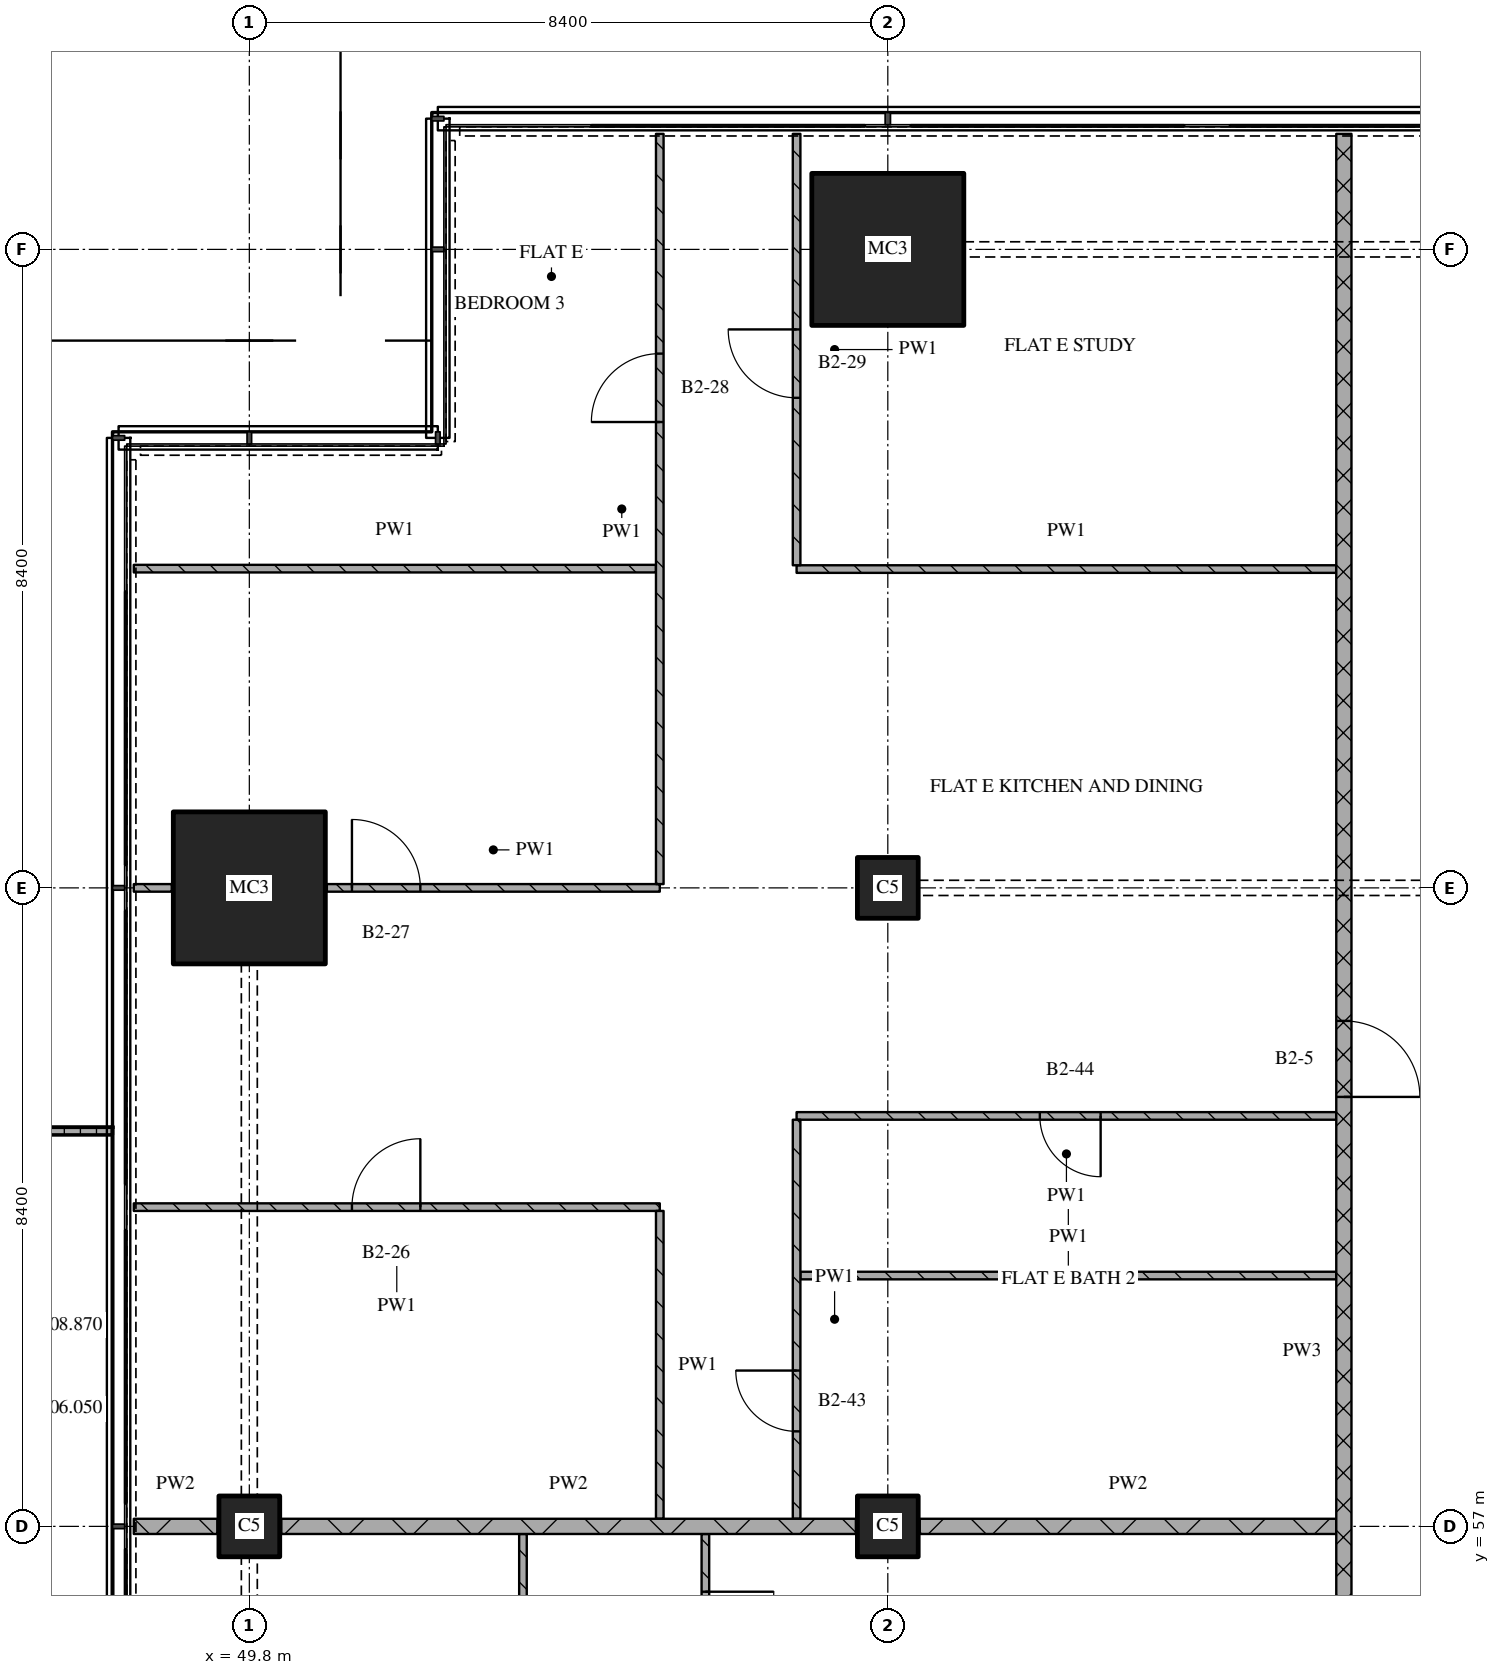
"""IFC4 building model, lengths in metres.
Left out: names, types, materials, properties, quantities, classifications, styles, units other than length and angle.
Written with IfcOpenShell. Run it as: python <this file> out.ifc"""

import sys

from ifc_helpers import new_model, si_unit, direction, frame, frame_2d, origin, origin_2d, place, context, subcontext, project, spatial, polyline, rectangle, outline, extrude, element, fill, save


model = new_model("IFC4")
c1 = context("Model", 3, precision=1e-05, world=origin(), true_north=direction((0.0, 1.0)))
c2 = subcontext(c1, "Body", "Model", "MODEL_VIEW")
j1 = project(units=[si_unit("LENGTHUNIT", "METRE"), si_unit("PLANEANGLEUNIT", "RADIAN")], contexts=[c1])
p1 = place(None, origin())
s1 = spatial("IfcSite", under=j1, at=p1, CompositionType="ELEMENT")
p2 = place(p1, origin())
s2 = spatial("IfcBuilding", under=s1, at=p2, CompositionType="ELEMENT")
p3 = place(p2, frame((0.0, 0.0, 106.05)))
s3 = spatial("IfcBuildingStorey", under=s2, at=p3, CompositionType="ELEMENT", Elevation=106.05)
p4 = place(p3, frame((49.8, 57.0, 0.0), z_axis=(0.0, 0.0, 1.0), x_axis=(1.0, 0.0, 0.0)))
e1 = element("IfcColumn", 1, at=p4, inside=s3, PredefinedType="COLUMN", context=c2, shape_type="SweptSolid", body=[
    extrude(rectangle(XDim=0.8, YDim=0.8, at=origin_2d()), origin(), (0.0, 0.0, 1.0), 3.6),
])
p5 = place(p3, frame((49.8, 65.4, 0.0), z_axis=(0.0, 0.0, 1.0), x_axis=(1.0, 0.0, 0.0)))
e2 = element("IfcColumn", 2, at=p5, inside=s3, PredefinedType="COLUMN", context=c2, shape_type="SweptSolid", body=[
    extrude(rectangle(XDim=2.0, YDim=2.0, at=origin_2d()), origin(), (0.0, 0.0, 1.0), 3.6),
])
for number, where, z_axis, x_axis in (
    (3, (58.2, 57.0, 0.0), (0.0, 0.0, 1.0), (1.0, 0.0, 0.0)),
    (4, (58.2, 65.4, 0.0), (0.0, 0.0, 1.0), (1.0, 0.0, 0.0)),
):
    element("IfcColumn", number, at=place(p3, frame(where, z_axis=z_axis, x_axis=x_axis)), inside=s3, PredefinedType="COLUMN", context=c2, shape_type="SweptSolid", body=[
        extrude(rectangle(XDim=0.8, YDim=0.8, at=origin_2d()), origin(), (0.0, 0.0, 1.0), 3.6),
    ])
p6 = place(p3, frame((58.2, 73.8, 0.0), z_axis=(0.0, 0.0, 1.0), x_axis=(1.0, 0.0, 0.0)))
e5 = element("IfcColumn", 5, at=p6, inside=s3, PredefinedType="COLUMN", context=c2, shape_type="SweptSolid", body=[
    extrude(rectangle(XDim=2.0, YDim=2.0, at=origin_2d()), origin(), (0.0, 0.0, 1.0), 3.6),
])
p7 = place(p3, origin())
e6 = element("IfcWall", 6, at=p7, inside=s3, PredefinedType="SOLIDWALL", context=c2, shape_type="SweptSolid", body=[
    extrude(outline(polyline([(48.0, 62.25), (48.0, 62.15), (46.233, 62.15), (46.233, 56.05), (48.0, 56.05), (48.0, 55.95), (46.133, 55.95), (46.133, 62.25), (48.0, 62.25)])), origin(), (0.0, 0.0, 1.0), 1.0),
])
p8 = place(p3, frame((48.28, 57.0, 0.0), z_axis=(0.0, 0.0, 1.0), x_axis=(1.0, 0.0, 0.0)))
e7 = element("IfcWall", 7, at=p8, inside=s3, PredefinedType="PARTITIONING", context=c2, shape_type="SweptSolid", body=[
    extrude(rectangle(XDim=1.1, YDim=0.2, at=frame_2d((0.55, 0.0))), origin(), (0.0, 0.0, 1.0), 3.32),
])
p9 = place(p3, frame((50.22, 57.0, 0.0), z_axis=(0.0, 0.0, 1.0), x_axis=(1.0, 0.0, 0.0)))
e8 = element("IfcWall", 8, at=p9, inside=s3, PredefinedType="PARTITIONING", context=c2, shape_type="SweptSolid", body=[
    extrude(rectangle(XDim=7.56, YDim=0.2, at=frame_2d((3.78, 0.0))), origin(), (0.0, 0.0, 1.0), 3.32),
])
p10 = place(p3, frame((58.62, 57.0, 0.0), z_axis=(0.0, 0.0, 1.0), x_axis=(1.0, 0.0, 0.0)))
e9 = element("IfcWall", 9, at=p10, inside=s3, PredefinedType="PARTITIONING", context=c2, shape_type="SweptSolid", body=[
    extrude(rectangle(XDim=5.48, YDim=0.2, at=frame_2d((2.74, 0.0))), origin(), (0.0, 0.0, 1.0), 3.32),
])
p11 = place(p3, frame((57.05, 60.3, 0.0), z_axis=(0.0, 0.0, 1.0), x_axis=(1.0, 0.0, 0.0)))
e10 = element("IfcWall", 10, at=p11, inside=s3, PredefinedType="PARTITIONING", context=c2, shape_type="SweptSolid", body=[
    extrude(rectangle(XDim=7.05, YDim=0.1, at=frame_2d((3.525, 0.0))), origin(), (0.0, 0.0, 1.0), 3.32),
])
p12 = place(p3, frame((55.2, 61.2, 0.0), z_axis=(0.0, 0.0, 1.0), x_axis=(-1.0, 0.0, 0.0)))
e11 = element("IfcWall", 11, at=p12, inside=s3, PredefinedType="PARTITIONING", context=c2, shape_type="SweptSolid", body=[
    extrude(rectangle(XDim=6.92, YDim=0.1, at=frame_2d((3.46, 0.0))), origin(), (0.0, 0.0, 1.0), 3.32),
])
p13 = place(p12, frame((3.15, 0.0, 0.0)))
e12 = element("IfcOpeningElement", 12, at=p13, cuts=e11, PredefinedType="OPENING", context=c2, shape_type="SweptSolid", body=[
    extrude(rectangle(XDim=0.9, YDim=2.1, at=frame_2d((0.45, 1.05))), frame((0.0, 0.06, 0.0), z_axis=(0.0, -1.0, 0.0), x_axis=(1.0, 0.0, 0.0)), (0.0, 0.0, 1.0), 0.12),
])
p14 = place(p3, frame((64.1, 62.4, 0.0), z_axis=(0.0, 0.0, 1.0), x_axis=(-1.0, 0.0, 0.0)))
e13 = element("IfcWall", 13, at=p14, inside=s3, PredefinedType="PARTITIONING", context=c2, shape_type="SweptSolid", body=[
    extrude(rectangle(XDim=7.1, YDim=0.1, at=frame_2d((3.55, 0.0))), origin(), (0.0, 0.0, 1.0), 3.32),
])
p15 = place(p14, frame((3.1, 0.0, 0.0)))
e14 = element("IfcOpeningElement", 14, at=p15, cuts=e13, PredefinedType="OPENING", context=c2, shape_type="SweptSolid", body=[
    extrude(rectangle(XDim=0.8, YDim=2.1, at=frame_2d((0.4, 1.05))), frame((0.0, 0.06, 0.0), z_axis=(0.0, -1.0, 0.0), x_axis=(1.0, 0.0, 0.0)), (0.0, 0.0, 1.0), 0.12),
])
p16 = place(p3, frame((48.28, 65.4, 0.0), z_axis=(0.0, 0.0, 1.0), x_axis=(1.0, 0.0, 0.0)))
e15 = element("IfcWall", 15, at=p16, inside=s3, PredefinedType="PARTITIONING", context=c2, shape_type="SweptSolid", body=[
    extrude(rectangle(XDim=0.5, YDim=0.1, at=frame_2d((0.25, 0.0))), origin(), (0.0, 0.0, 1.0), 3.32),
])
p17 = place(p3, frame((50.82, 65.4, 0.0), z_axis=(0.0, 0.0, 1.0), x_axis=(1.0, 0.0, 0.0)))
e16 = element("IfcWall", 16, at=p17, inside=s3, PredefinedType="PARTITIONING", context=c2, shape_type="SweptSolid", body=[
    extrude(rectangle(XDim=4.38, YDim=0.1, at=frame_2d((2.19, 0.0))), origin(), (0.0, 0.0, 1.0), 3.32),
])
p18 = place(p17, frame((0.33, 0.0, 0.0)))
e17 = element("IfcOpeningElement", 17, at=p18, cuts=e16, PredefinedType="OPENING", context=c2, shape_type="SweptSolid", body=[
    extrude(rectangle(XDim=0.9, YDim=2.1, at=frame_2d((0.45, 1.05))), frame((0.0, 0.06, 0.0), z_axis=(0.0, -1.0, 0.0), x_axis=(1.0, 0.0, 0.0)), (0.0, 0.0, 1.0), 0.12),
])
p19 = place(p3, frame((57.0, 69.594, 0.0), z_axis=(0.0, 0.0, 1.0), x_axis=(1.0, 0.0, 0.0)))
e18 = element("IfcWall", 18, at=p19, inside=s3, PredefinedType="PARTITIONING", context=c2, shape_type="SweptSolid", body=[
    extrude(rectangle(XDim=7.1, YDim=0.1, at=frame_2d((3.55, 0.0))), origin(), (0.0, 0.0, 1.0), 3.32),
])
p20 = place(p3, frame((48.28, 69.6, 0.0), z_axis=(0.0, 0.0, 1.0), x_axis=(1.0, 0.0, 0.0)))
e19 = element("IfcWall", 19, at=p20, inside=s3, PredefinedType="PARTITIONING", context=c2, shape_type="SweptSolid", body=[
    extrude(rectangle(XDim=6.87, YDim=0.1, at=frame_2d((3.435, 0.0))), origin(), (0.0, 0.0, 1.0), 3.32),
])
p21 = place(p3, frame((53.4, 56.9, 0.0), z_axis=(0.0, 0.0, 1.0), x_axis=(0.0, -1.0, 0.0)))
e20 = element("IfcWall", 20, at=p21, inside=s3, PredefinedType="PARTITIONING", context=c2, shape_type="SweptSolid", body=[
    extrude(rectangle(XDim=8.25, YDim=0.1, at=frame_2d((4.125, 0.0))), origin(), (0.0, 0.0, 1.0), 3.32),
])
p22 = place(p3, frame((55.2, 61.15, 0.0), z_axis=(0.0, 0.0, 1.0), x_axis=(0.0, -1.0, 0.0)))
e21 = element("IfcWall", 21, at=p22, inside=s3, PredefinedType="PARTITIONING", context=c2, shape_type="SweptSolid", body=[
    extrude(rectangle(XDim=4.05, YDim=0.1, at=frame_2d((2.025, 0.0))), origin(), (0.0, 0.0, 1.0), 3.32),
])
p23 = place(p3, frame((55.2, 65.45, 0.0), z_axis=(0.0, 0.0, 1.0), x_axis=(0.0, 1.0, 0.0)))
e22 = element("IfcWall", 22, at=p23, inside=s3, PredefinedType="PARTITIONING", context=c2, shape_type="SweptSolid", body=[
    extrude(rectangle(XDim=9.87, YDim=0.1, at=frame_2d((4.935, 0.0))), origin(), (0.0, 0.0, 1.0), 3.32),
])
p24 = place(p23, frame((6.079, 0.0, 0.0)))
e23 = element("IfcOpeningElement", 23, at=p24, cuts=e22, PredefinedType="OPENING", context=c2, shape_type="SweptSolid", body=[
    extrude(rectangle(XDim=0.9, YDim=2.1, at=frame_2d((0.45, 1.05))), frame((0.0, 0.06, 0.0), z_axis=(0.0, -1.0, 0.0), x_axis=(1.0, 0.0, 0.0)), (0.0, 0.0, 1.0), 0.12),
])
p25 = place(p3, frame((55.8, 56.9, 0.0), z_axis=(0.0, 0.0, 1.0), x_axis=(0.0, -1.0, 0.0)))
e24 = element("IfcWall", 24, at=p25, inside=s3, PredefinedType="PARTITIONING", context=c2, shape_type="SweptSolid", body=[
    extrude(rectangle(XDim=2.469, YDim=0.1, at=frame_2d((1.234, 0.0))), origin(), (0.0, 0.0, 1.0), 3.32),
])
p26 = place(p25, frame((0.76, 0.0, 0.0)))
e25 = element("IfcOpeningElement", 25, at=p26, cuts=e24, PredefinedType="OPENING", context=c2, shape_type="SweptSolid", body=[
    extrude(rectangle(XDim=0.9, YDim=2.1, at=frame_2d((0.45, 1.05))), frame((0.0, 0.06, 0.0), z_axis=(0.0, -1.0, 0.0), x_axis=(1.0, 0.0, 0.0)), (0.0, 0.0, 1.0), 0.12),
])
p27 = place(p3, frame((57.0, 62.35, 0.0), z_axis=(0.0, 0.0, 1.0), x_axis=(0.0, -1.0, 0.0)))
e26 = element("IfcWall", 26, at=p27, inside=s3, PredefinedType="PARTITIONING", context=c2, shape_type="SweptSolid", body=[
    extrude(rectangle(XDim=5.25, YDim=0.1, at=frame_2d((2.625, 0.0))), origin(), (0.0, 0.0, 1.0), 3.32),
])
p28 = place(p27, frame((3.3, 0.0, 0.0)))
e27 = element("IfcOpeningElement", 27, at=p28, cuts=e26, PredefinedType="OPENING", context=c2, shape_type="SweptSolid", body=[
    extrude(rectangle(XDim=0.8, YDim=2.1, at=frame_2d((0.4, 1.05))), frame((0.0, 0.06, 0.0), z_axis=(0.0, -1.0, 0.0), x_axis=(1.0, 0.0, 0.0)), (0.0, 0.0, 1.0), 0.12),
])
p29 = place(p3, frame((57.0, 75.32, 0.0), z_axis=(0.0, 0.0, 1.0), x_axis=(0.0, -1.0, 0.0)))
e28 = element("IfcWall", 28, at=p29, inside=s3, PredefinedType="PARTITIONING", context=c2, shape_type="SweptSolid", body=[
    extrude(rectangle(XDim=5.676, YDim=0.1, at=frame_2d((2.838, 0.0))), origin(), (0.0, 0.0, 1.0), 3.32),
])
p30 = place(p29, frame((2.573, 0.0, 0.0)))
e29 = element("IfcOpeningElement", 29, at=p30, cuts=e28, PredefinedType="OPENING", context=c2, shape_type="SweptSolid", body=[
    extrude(rectangle(XDim=0.9, YDim=2.1, at=frame_2d((0.45, 1.05))), frame((0.0, 0.06, 0.0), z_axis=(0.0, -1.0, 0.0), x_axis=(1.0, 0.0, 0.0)), (0.0, 0.0, 1.0), 0.12),
])
p31 = place(p3, frame((64.2, 43.3, 0.0), z_axis=(0.0, 0.0, 1.0), x_axis=(0.0, 1.0, 0.0)))
e30 = element("IfcWall", 30, at=p31, inside=s3, PredefinedType="PARTITIONING", context=c2, shape_type="SweptSolid", body=[
    extrude(rectangle(XDim=32.02, YDim=0.2, at=frame_2d((16.01, 0.0))), origin(), (0.0, 0.0, 1.0), 3.32),
])
p32 = place(p31, frame((4.95, 0.0, 0.0)))
e31 = element("IfcOpeningElement", 31, at=p32, cuts=e30, PredefinedType="OPENING", context=c2, shape_type="SweptSolid", body=[
    extrude(rectangle(XDim=1.0, YDim=2.1, at=frame_2d((0.5, 1.05))), frame((0.0, 0.11, 0.0), z_axis=(0.0, -1.0, 0.0), x_axis=(1.0, 0.0, 0.0)), (0.0, 0.0, 1.0), 0.22),
])
p33 = place(p31, frame((19.35, 0.0, 0.0)))
e32 = element("IfcOpeningElement", 32, at=p33, cuts=e30, PredefinedType="OPENING", context=c2, shape_type="SweptSolid", body=[
    extrude(rectangle(XDim=1.0, YDim=2.1, at=frame_2d((0.5, 1.05))), frame((0.0, 0.11, 0.0), z_axis=(0.0, -1.0, 0.0), x_axis=(1.0, 0.0, 0.0)), (0.0, 0.0, 1.0), 0.22),
])
p34 = place(p13, origin())
e33 = element("IfcDoor", 33, at=p34, inside=s3, OperationType="SINGLE_SWING_RIGHT", PredefinedType="DOOR", context=c2, shape_type="SweptSolid", body=[
    extrude(rectangle(XDim=0.9, YDim=2.1, at=frame_2d((0.45, 1.05))), frame((0.0, 0.025, 0.0), z_axis=(0.0, -1.0, 0.0), x_axis=(1.0, 0.0, 0.0)), (0.0, 0.0, 1.0), 0.05),
])
fill(e12, e33)
p35 = place(p15, origin())
e34 = element("IfcDoor", 34, at=p35, inside=s3, OperationType="SINGLE_SWING_LEFT", PredefinedType="DOOR", context=c2, shape_type="SweptSolid", body=[
    extrude(rectangle(XDim=0.8, YDim=2.1, at=frame_2d((0.4, 1.05))), frame((0.0, 0.025, 0.0), z_axis=(0.0, -1.0, 0.0), x_axis=(1.0, 0.0, 0.0)), (0.0, 0.0, 1.0), 0.05),
])
fill(e14, e34)
p36 = place(p18, origin())
e35 = element("IfcDoor", 35, at=p36, inside=s3, OperationType="SINGLE_SWING_LEFT", PredefinedType="DOOR", context=c2, shape_type="SweptSolid", body=[
    extrude(rectangle(XDim=0.9, YDim=2.1, at=frame_2d((0.45, 1.05))), frame((0.0, 0.025, 0.0), z_axis=(0.0, -1.0, 0.0), x_axis=(1.0, 0.0, 0.0)), (0.0, 0.0, 1.0), 0.05),
])
fill(e17, e35)
p37 = place(p24, origin())
e36 = element("IfcDoor", 36, at=p37, inside=s3, OperationType="SINGLE_SWING_LEFT", PredefinedType="DOOR", context=c2, shape_type="SweptSolid", body=[
    extrude(rectangle(XDim=0.9, YDim=2.1, at=frame_2d((0.45, 1.05))), frame((0.0, 0.025, 0.0), z_axis=(0.0, -1.0, 0.0), x_axis=(1.0, 0.0, 0.0)), (0.0, 0.0, 1.0), 0.05),
])
fill(e23, e36)
p38 = place(p26, origin())
e37 = element("IfcDoor", 37, at=p38, inside=s3, OperationType="SINGLE_SWING_LEFT", PredefinedType="DOOR", context=c2, shape_type="SweptSolid", body=[
    extrude(rectangle(XDim=0.9, YDim=2.1, at=frame_2d((0.45, 1.05))), frame((0.0, 0.025, 0.0), z_axis=(0.0, -1.0, 0.0), x_axis=(1.0, 0.0, 0.0)), (0.0, 0.0, 1.0), 0.05),
])
fill(e25, e37)
p39 = place(p28, origin())
e38 = element("IfcDoor", 38, at=p39, inside=s3, OperationType="SINGLE_SWING_RIGHT", PredefinedType="DOOR", context=c2, shape_type="SweptSolid", body=[
    extrude(rectangle(XDim=0.8, YDim=2.1, at=frame_2d((0.4, 1.05))), frame((0.0, 0.025, 0.0), z_axis=(0.0, -1.0, 0.0), x_axis=(1.0, 0.0, 0.0)), (0.0, 0.0, 1.0), 0.05),
])
fill(e27, e38)
p40 = place(p30, origin())
e39 = element("IfcDoor", 39, at=p40, inside=s3, OperationType="SINGLE_SWING_RIGHT", PredefinedType="DOOR", context=c2, shape_type="SweptSolid", body=[
    extrude(rectangle(XDim=0.9, YDim=2.1, at=frame_2d((0.45, 1.05))), frame((0.0, 0.025, 0.0), z_axis=(0.0, -1.0, 0.0), x_axis=(1.0, 0.0, 0.0)), (0.0, 0.0, 1.0), 0.05),
])
fill(e29, e39)
p41 = place(p33, origin())
e40 = element("IfcDoor", 40, at=p41, inside=s3, OperationType="SINGLE_SWING_RIGHT", PredefinedType="DOOR", context=c2, shape_type="SweptSolid", body=[
    extrude(rectangle(XDim=1.0, YDim=2.1, at=frame_2d((0.5, 1.05))), frame((0.0, 0.025, 0.0), z_axis=(0.0, -1.0, 0.0), x_axis=(1.0, 0.0, 0.0)), (0.0, 0.0, 1.0), 0.05),
])
fill(e32, e40)
save(model, sys.argv[1])
